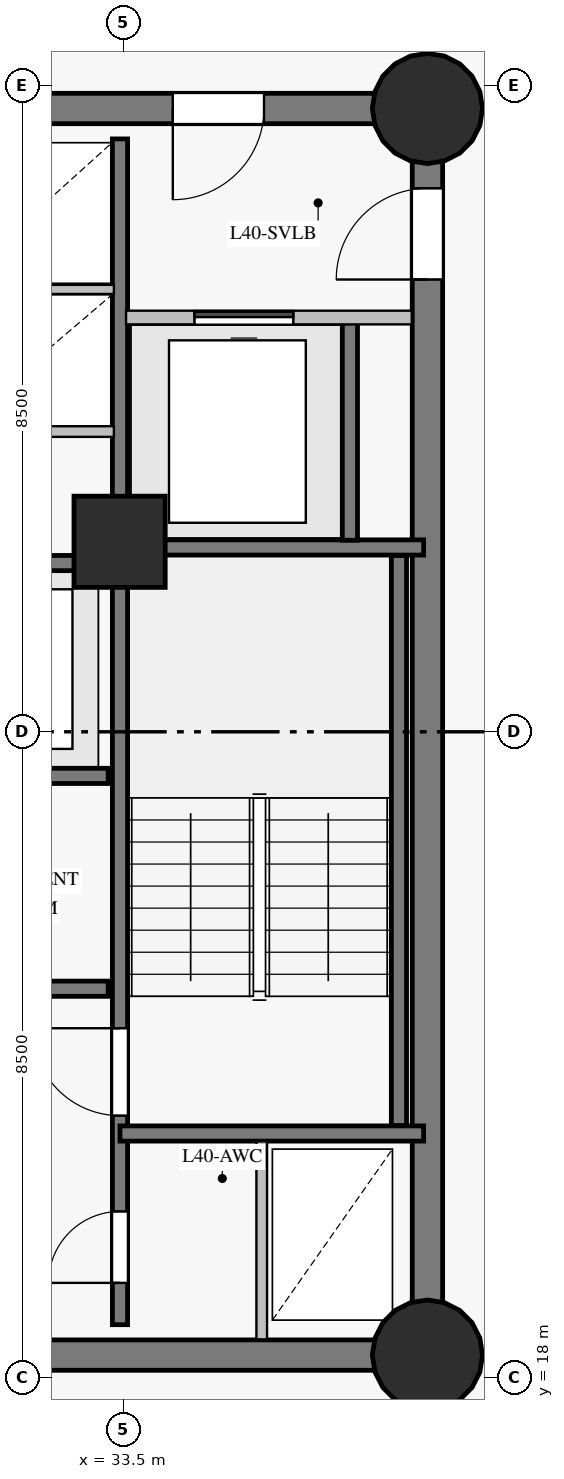
"""IFC4 building model, lengths in metres.
Left out: names, types, materials, properties, quantities, classifications, styles, units other than length and angle.
Written with IfcOpenShell. Run it as: python <this file> out.ifc"""

import sys

from ifc_helpers import new_model, si_unit, direction, frame, frame_2d, origin, origin_with_axes, origin_2d, place, context, subcontext, project, spatial, rectangle, circle, extrude, source, transform, mapped, element, fill, save


model = new_model("IFC4")
c1 = context("Model", 3, precision=1e-05, world=origin(), true_north=direction((0.0, 1.0)))
c2 = subcontext(c1, "Body", "Model", "MODEL_VIEW")
j1 = project(units=[si_unit("LENGTHUNIT", "METRE"), si_unit("PLANEANGLEUNIT", "RADIAN")], contexts=[c1])
p1 = place(None, origin())
s1 = spatial("IfcSite", under=j1, at=p1, CompositionType="ELEMENT")
p2 = place(p1, origin())
s2 = spatial("IfcBuilding", under=s1, at=p2, CompositionType="ELEMENT")
p3 = place(p2, frame((0.0, 0.0, 141.95)))
s3 = spatial("IfcBuildingStorey", under=s2, at=p3, CompositionType="ELEMENT", Elevation=141.95)
p4 = place(p3, frame((26.55, 18.3, 0.0), z_axis=(0.0, 0.0, 1.0), x_axis=(1.0, 0.0, 0.0)))
e1 = element("IfcWall", 1, at=p4, inside=s3, PredefinedType="SHEAR", context=c2, shape_type="SweptSolid", body=[
    extrude(rectangle(XDim=10.95, YDim=0.4, at=frame_2d((5.475, 0.0))), origin(), (0.0, 0.0, 1.0), 2.825),
])
p5 = place(p4, frame((4.55, 0.0, 0.0)))
e2 = element("IfcOpeningElement", 2, at=p5, cuts=e1, PredefinedType="OPENING", context=c2, shape_type="SweptSolid", body=[
    extrude(rectangle(XDim=1.4, YDim=2.2, at=frame_2d((0.7, 1.1))), frame((0.0, 0.21, 0.0), z_axis=(0.0, -1.0, 0.0), x_axis=(1.0, 0.0, 0.0)), (0.0, 0.0, 1.0), 0.42),
])
p6 = place(p3, frame((37.5, 18.3, 0.0), z_axis=(0.0, 0.0, 1.0), x_axis=(0.0, 1.0, 0.0)))
e3 = element("IfcWall", 3, at=p6, inside=s3, PredefinedType="SHEAR", context=c2, shape_type="SweptSolid", body=[
    extrude(rectangle(XDim=16.4, YDim=0.4, at=frame_2d((8.2, 0.0))), origin(), (0.0, 0.0, 1.0), 2.825),
])
p7 = place(p6, frame((14.15, 0.0, 0.0)))
e4 = element("IfcOpeningElement", 4, at=p7, cuts=e3, PredefinedType="OPENING", context=c2, shape_type="SweptSolid", body=[
    extrude(rectangle(XDim=1.2, YDim=2.15, at=frame_2d((0.6, 1.075))), frame((0.0, 0.21, 0.0), z_axis=(0.0, -1.0, 0.0), x_axis=(1.0, 0.0, 0.0)), (0.0, 0.0, 1.0), 0.42),
])
p8 = place(p3, frame((37.5, 34.7, 0.0), z_axis=(0.0, 0.0, 1.0), x_axis=(-1.0, 0.0, 0.0)))
e5 = element("IfcWall", 5, at=p8, inside=s3, PredefinedType="SHEAR", context=c2, shape_type="SweptSolid", body=[
    extrude(rectangle(XDim=10.95, YDim=0.4, at=frame_2d((5.475, 0.0))), origin(), (0.0, 0.0, 1.0), 2.825),
])
p9 = place(p8, frame((2.15, 0.0, 0.0)))
e6 = element("IfcOpeningElement", 6, at=p9, cuts=e5, PredefinedType="OPENING", context=c2, shape_type="SweptSolid", body=[
    extrude(rectangle(XDim=1.2, YDim=2.15, at=frame_2d((0.6, 1.075))), frame((0.0, 0.21, 0.0), z_axis=(0.0, -1.0, 0.0), x_axis=(1.0, 0.0, 0.0)), (0.0, 0.0, 1.0), 0.42),
])
p10 = place(p8, frame((6.35, 0.0, 0.0)))
e7 = element("IfcOpeningElement", 7, at=p10, cuts=e5, PredefinedType="OPENING", context=c2, shape_type="SweptSolid", body=[
    extrude(rectangle(XDim=1.1, YDim=2.15, at=frame_2d((0.55, 1.075))), frame((0.0, 0.21, 0.0), z_axis=(0.0, -1.0, 0.0), x_axis=(1.0, 0.0, 0.0)), (0.0, 0.0, 1.0), 0.42),
])
m1 = source(origin_with_axes(), c2, "Body", "SweptSolid", [
    extrude(circle(Radius=0.725, at=origin_2d()), origin(), (0.0, 0.0, 1.0), 3.05),
])
for number, where, z_axis, x_axis in (
    (8, (37.5, 18.3, 0.0), (0.0, 0.0, 1.0), (1.0, 0.0, 0.0)),
    (9, (37.5, 34.7, 0.0), (0.0, 0.0, 1.0), (1.0, 0.0, 0.0)),
):
    element("IfcColumn", number, at=place(p3, frame(where, z_axis=z_axis, x_axis=x_axis)), inside=s3, PredefinedType="COLUMN", context=c2, shape_type="MappedRepresentation", body=[
        mapped(m1, transform((0.0, 0.0, 0.0), scale=1.0)),
    ])
m2 = source(origin_with_axes(), c2, "Body", "SweptSolid", [
    extrude(rectangle(XDim=1.2, YDim=1.2, at=origin_2d()), origin(), (0.0, 0.0, 1.0), 3.05),
])
p11 = place(p3, frame((33.45, 29.0, 0.0), z_axis=(0.0, 0.0, 1.0), x_axis=(1.0, 0.0, 0.0)))
e10 = element("IfcColumn", 10, at=p11, inside=s3, PredefinedType="COLUMN", context=c2, shape_type="MappedRepresentation", body=[
    mapped(m2, transform((0.0, 0.0, 0.0), scale=1.0)),
])
p12 = place(p3, frame((33.455, 18.7, 0.0), z_axis=(0.0, 0.0, 1.0), x_axis=(0.0, 1.0, 0.0)))
e11 = element("IfcWall", 11, at=p12, inside=s3, PredefinedType="SHEAR", context=c2, shape_type="SweptSolid", body=[
    extrude(rectangle(XDim=15.6, YDim=0.2, at=frame_2d((7.8, 0.0))), origin(), (0.0, 0.0, 1.0), 2.825),
])
p13 = place(p12, frame((2.75, 0.0, 0.0)))
e12 = element("IfcOpeningElement", 12, at=p13, cuts=e11, PredefinedType="OPENING", context=c2, shape_type="SweptSolid", body=[
    extrude(rectangle(XDim=1.15, YDim=2.15, at=frame_2d((0.575, 1.075))), frame((0.0, 0.11, 0.0), z_axis=(0.0, -1.0, 0.0), x_axis=(1.0, 0.0, 0.0)), (0.0, 0.0, 1.0), 0.22),
])
p14 = place(p12, frame((0.55, 0.0, 0.0)))
e13 = element("IfcOpeningElement", 13, at=p14, cuts=e11, PredefinedType="OPENING", context=c2, shape_type="SweptSolid", body=[
    extrude(rectangle(XDim=0.94, YDim=2.1, at=frame_2d((0.47, 1.05))), frame((0.0, 0.11, 0.0), z_axis=(0.0, -1.0, 0.0), x_axis=(1.0, 0.0, 0.0)), (0.0, 0.0, 1.0), 0.22),
])
p15 = place(p3, frame((23.7, 23.12, 0.0), z_axis=(0.0, 0.0, 1.0), x_axis=(1.0, 0.0, 0.0)))
e14 = element("IfcWall", 14, at=p15, inside=s3, PredefinedType="SHEAR", context=c2, shape_type="SweptSolid", body=[
    extrude(rectangle(XDim=9.6, YDim=0.2, at=frame_2d((4.8, 0.0))), origin(), (0.0, 0.0, 1.0), 2.825),
])
p16 = place(p15, frame((1.1, 0.0, 0.0)))
e15 = element("IfcOpeningElement", 15, at=p16, cuts=e14, PredefinedType="OPENING", context=c2, shape_type="SweptSolid", body=[
    extrude(rectangle(XDim=0.92, YDim=2.1, at=frame_2d((0.46, 1.05))), frame((0.0, 0.11, 0.0), z_axis=(0.0, -1.0, 0.0), x_axis=(1.0, 0.0, 0.0)), (0.0, 0.0, 1.0), 0.22),
])
p17 = place(p15, frame((5.2, 0.0, 0.0)))
e16 = element("IfcOpeningElement", 16, at=p17, cuts=e14, PredefinedType="OPENING", context=c2, shape_type="SweptSolid", body=[
    extrude(rectangle(XDim=1.0, YDim=2.15, at=frame_2d((0.5, 1.075))), frame((0.0, 0.11, 0.0), z_axis=(0.0, -1.0, 0.0), x_axis=(1.0, 0.0, 0.0)), (0.0, 0.0, 1.0), 0.22),
])
p18 = place(p3, frame((23.7, 25.92, 0.0), z_axis=(0.0, 0.0, 1.0), x_axis=(1.0, 0.0, 0.0)))
e17 = element("IfcWall", 17, at=p18, inside=s3, PredefinedType="SHEAR", context=c2, shape_type="SweptSolid", body=[
    extrude(rectangle(XDim=9.6, YDim=0.2, at=frame_2d((4.8, 0.0))), origin(), (0.0, 0.0, 1.0), 2.825),
])
p19 = place(p3, frame((23.7, 28.72, 0.0), z_axis=(0.0, 0.0, 1.0), x_axis=(1.0, 0.0, 0.0)))
e18 = element("IfcWall", 18, at=p19, inside=s3, PredefinedType="SHEAR", context=c2, shape_type="SweptSolid", body=[
    extrude(rectangle(XDim=9.6, YDim=0.2, at=frame_2d((4.8, 0.0))), origin(), (0.0, 0.0, 1.0), 2.825),
])
p20 = place(p19, frame((0.6, 0.0, 0.0)))
e19 = element("IfcOpeningElement", 19, at=p20, cuts=e18, PredefinedType="OPENING", context=c2, shape_type="SweptSolid", body=[
    extrude(rectangle(XDim=1.1, YDim=2.15, at=frame_2d((0.55, 1.075))), frame((0.0, 0.11, 0.0), z_axis=(0.0, -1.0, 0.0), x_axis=(1.0, 0.0, 0.0)), (0.0, 0.0, 1.0), 0.22),
])
p21 = place(p19, frame((2.98, 0.0, 0.0)))
e20 = element("IfcOpeningElement", 20, at=p21, cuts=e18, PredefinedType="OPENING", context=c2, shape_type="SweptSolid", body=[
    extrude(rectangle(XDim=1.1, YDim=2.15, at=frame_2d((0.55, 1.075))), frame((0.0, 0.11, 0.0), z_axis=(0.0, -1.0, 0.0), x_axis=(1.0, 0.0, 0.0)), (0.0, 0.0, 1.0), 0.22),
])
p22 = place(p19, frame((5.36, 0.0, 0.0)))
e21 = element("IfcOpeningElement", 21, at=p22, cuts=e18, PredefinedType="OPENING", context=c2, shape_type="SweptSolid", body=[
    extrude(rectangle(XDim=1.1, YDim=2.15, at=frame_2d((0.55, 1.075))), frame((0.0, 0.11, 0.0), z_axis=(0.0, -1.0, 0.0), x_axis=(1.0, 0.0, 0.0)), (0.0, 0.0, 1.0), 0.22),
])
p23 = place(p19, frame((7.74, 0.0, 0.0)))
e22 = element("IfcOpeningElement", 22, at=p23, cuts=e18, PredefinedType="OPENING", context=c2, shape_type="SweptSolid", body=[
    extrude(rectangle(XDim=1.1, YDim=2.15, at=frame_2d((0.55, 1.075))), frame((0.0, 0.11, 0.0), z_axis=(0.0, -1.0, 0.0), x_axis=(1.0, 0.0, 0.0)), (0.0, 0.0, 1.0), 0.22),
])
p24 = place(p3, frame((37.125, 21.32, 0.0), z_axis=(0.0, 0.0, 1.0), x_axis=(0.0, 1.0, 0.0)))
e23 = element("IfcWall", 23, at=p24, inside=s3, PredefinedType="SHEAR", context=c2, shape_type="SweptSolid", body=[
    extrude(rectangle(XDim=7.5, YDim=0.2, at=frame_2d((3.75, 0.0))), origin(), (0.0, 0.0, 1.0), 2.825),
])
for number, where, z_axis, x_axis in (
    (24, (33.455, 21.215, 0.0), (0.0, 0.0, 1.0), (1.0, 0.0, 0.0)),
    (25, (33.455, 28.925, 0.0), (0.0, 0.0, 1.0), (1.0, 0.0, 0.0)),
):
    element("IfcWall", number, at=place(p3, frame(where, z_axis=z_axis, x_axis=x_axis)), inside=s3, PredefinedType="SHEAR", context=c2, shape_type="SweptSolid", body=[
        extrude(rectangle(XDim=3.995, YDim=0.2, at=frame_2d((1.998, 0.0))), origin(), (0.0, 0.0, 1.0), 2.825),
    ])
p25 = place(p3, frame((36.48, 29.02, 0.0), z_axis=(0.0, 0.0, 1.0), x_axis=(0.0, 1.0, 0.0)))
e26 = element("IfcWall", 26, at=p25, inside=s3, PredefinedType="SHEAR", context=c2, shape_type="SweptSolid", body=[
    extrude(rectangle(XDim=2.86, YDim=0.2, at=frame_2d((1.43, 0.0))), origin(), (0.0, 0.0, 1.0), 2.825),
])
p26 = place(p3, frame((33.535, 31.95, 0.0), z_axis=(0.0, 0.0, 1.0), x_axis=(1.0, 0.0, 0.0)))
e27 = element("IfcWall", 27, at=p26, inside=s3, PredefinedType="PARTITIONING", context=c2, shape_type="SweptSolid", body=[
    extrude(rectangle(XDim=3.759, YDim=0.18, at=frame_2d((1.879, 0.0))), origin(), (0.0, 0.0, 1.0), 2.825),
])
p27 = place(p26, frame((0.9, 0.0, 0.0)))
e28 = element("IfcOpeningElement", 28, at=p27, cuts=e27, PredefinedType="OPENING", context=c2, shape_type="SweptSolid", body=[
    extrude(rectangle(XDim=1.3, YDim=2.2, at=frame_2d((0.65, 1.1))), frame((0.0, 0.1, 0.0), z_axis=(0.0, -1.0, 0.0), x_axis=(1.0, 0.0, 0.0)), (0.0, 0.0, 1.0), 0.2),
])
p28 = place(p3, frame((35.32, 18.507, 0.0), z_axis=(0.0, 0.0, 1.0), x_axis=(0.0, 1.0, 0.0)))
e29 = element("IfcWall", 29, at=p28, inside=s3, PredefinedType="PARTITIONING", context=c2, shape_type="SweptSolid", body=[
    extrude(rectangle(XDim=2.604, YDim=0.14, at=frame_2d((1.302, 0.0))), origin(), (0.0, 0.0, 1.0), 2.825),
])
p29 = place(p3, frame((31.3, 30.45, 0.0), z_axis=(0.0, 0.0, 1.0), x_axis=(1.0, 0.0, 0.0)))
e30 = element("IfcWall", 30, at=p29, inside=s3, PredefinedType="PARTITIONING", context=c2, shape_type="SweptSolid", body=[
    extrude(rectangle(XDim=2.075, YDim=0.14, at=frame_2d((1.038, 0.0))), origin(), (0.0, 0.0, 1.0), 2.825),
])
p30 = place(p3, frame((31.3, 32.32, 0.0), z_axis=(0.0, 0.0, 1.0), x_axis=(1.0, 0.0, 0.0)))
e31 = element("IfcWall", 31, at=p30, inside=s3, PredefinedType="PARTITIONING", context=c2, shape_type="SweptSolid", body=[
    extrude(rectangle(XDim=2.075, YDim=0.12, at=frame_2d((1.038, 0.0))), origin(), (0.0, 0.0, 1.0), 2.825),
])
m3 = source(origin_with_axes(), c2, "Body", "SweptSolid", [
    extrude(rectangle(XDim=1.15, YDim=2.15, at=frame_2d((0.575, 1.075))), frame((0.0, 0.025, 0.0), z_axis=(0.0, -1.0, 0.0), x_axis=(1.0, 0.0, 0.0)), (0.0, 0.0, 1.0), 0.05),
])
p31 = place(p13, origin())
e32 = element("IfcDoor", 32, at=p31, inside=s3, OperationType="SINGLE_SWING_RIGHT", PredefinedType="DOOR", context=c2, shape_type="MappedRepresentation", body=[
    mapped(m3, transform((0.0, 0.0, 0.0), scale=1.0)),
])
fill(e12, e32)
m4 = source(origin_with_axes(), c2, "Body", "SweptSolid", [
    extrude(rectangle(XDim=1.2, YDim=2.15, at=frame_2d((0.6, 1.075))), frame((0.0, 0.025, 0.0), z_axis=(0.0, -1.0, 0.0), x_axis=(1.0, 0.0, 0.0)), (0.0, 0.0, 1.0), 0.05),
])
p32 = place(p7, origin())
e33 = element("IfcDoor", 33, at=p32, inside=s3, OperationType="SINGLE_SWING_LEFT", PredefinedType="DOOR", context=c2, shape_type="MappedRepresentation", body=[
    mapped(m4, transform((0.0, 0.0, 0.0), scale=1.0)),
])
fill(e4, e33)
p33 = place(p9, origin())
e34 = element("IfcDoor", 34, at=p33, inside=s3, OperationType="SINGLE_SWING_RIGHT", PredefinedType="DOOR", context=c2, shape_type="MappedRepresentation", body=[
    mapped(m4, transform((0.0, 0.0, 0.0), scale=1.0)),
])
fill(e6, e34)
m5 = source(origin_with_axes(), c2, "Body", "SweptSolid", [
    extrude(rectangle(XDim=1.3, YDim=2.2, at=frame_2d((0.65, 1.1))), frame((0.0, 0.025, 0.0), z_axis=(0.0, -1.0, 0.0), x_axis=(1.0, 0.0, 0.0)), (0.0, 0.0, 1.0), 0.05),
])
p34 = place(p27, origin())
e35 = element("IfcDoor", 35, at=p34, inside=s3, OperationType="SLIDING_TO_LEFT", PredefinedType="DOOR", context=c2, shape_type="MappedRepresentation", body=[
    mapped(m5, transform((0.0, 0.0, 0.0), scale=1.0)),
])
fill(e28, e35)
m6 = source(origin_with_axes(), c2, "Body", "SweptSolid", [
    extrude(rectangle(XDim=0.94, YDim=2.1, at=frame_2d((0.47, 1.05))), frame((0.0, 0.025, 0.0), z_axis=(0.0, -1.0, 0.0), x_axis=(1.0, 0.0, 0.0)), (0.0, 0.0, 1.0), 0.05),
])
p35 = place(p14, origin())
e36 = element("IfcDoor", 36, at=p35, inside=s3, OperationType="SINGLE_SWING_LEFT", PredefinedType="DOOR", context=c2, shape_type="MappedRepresentation", body=[
    mapped(m6, transform((0.0, 0.0, 0.0), scale=1.0)),
])
fill(e13, e36)
save(model, sys.argv[1])
